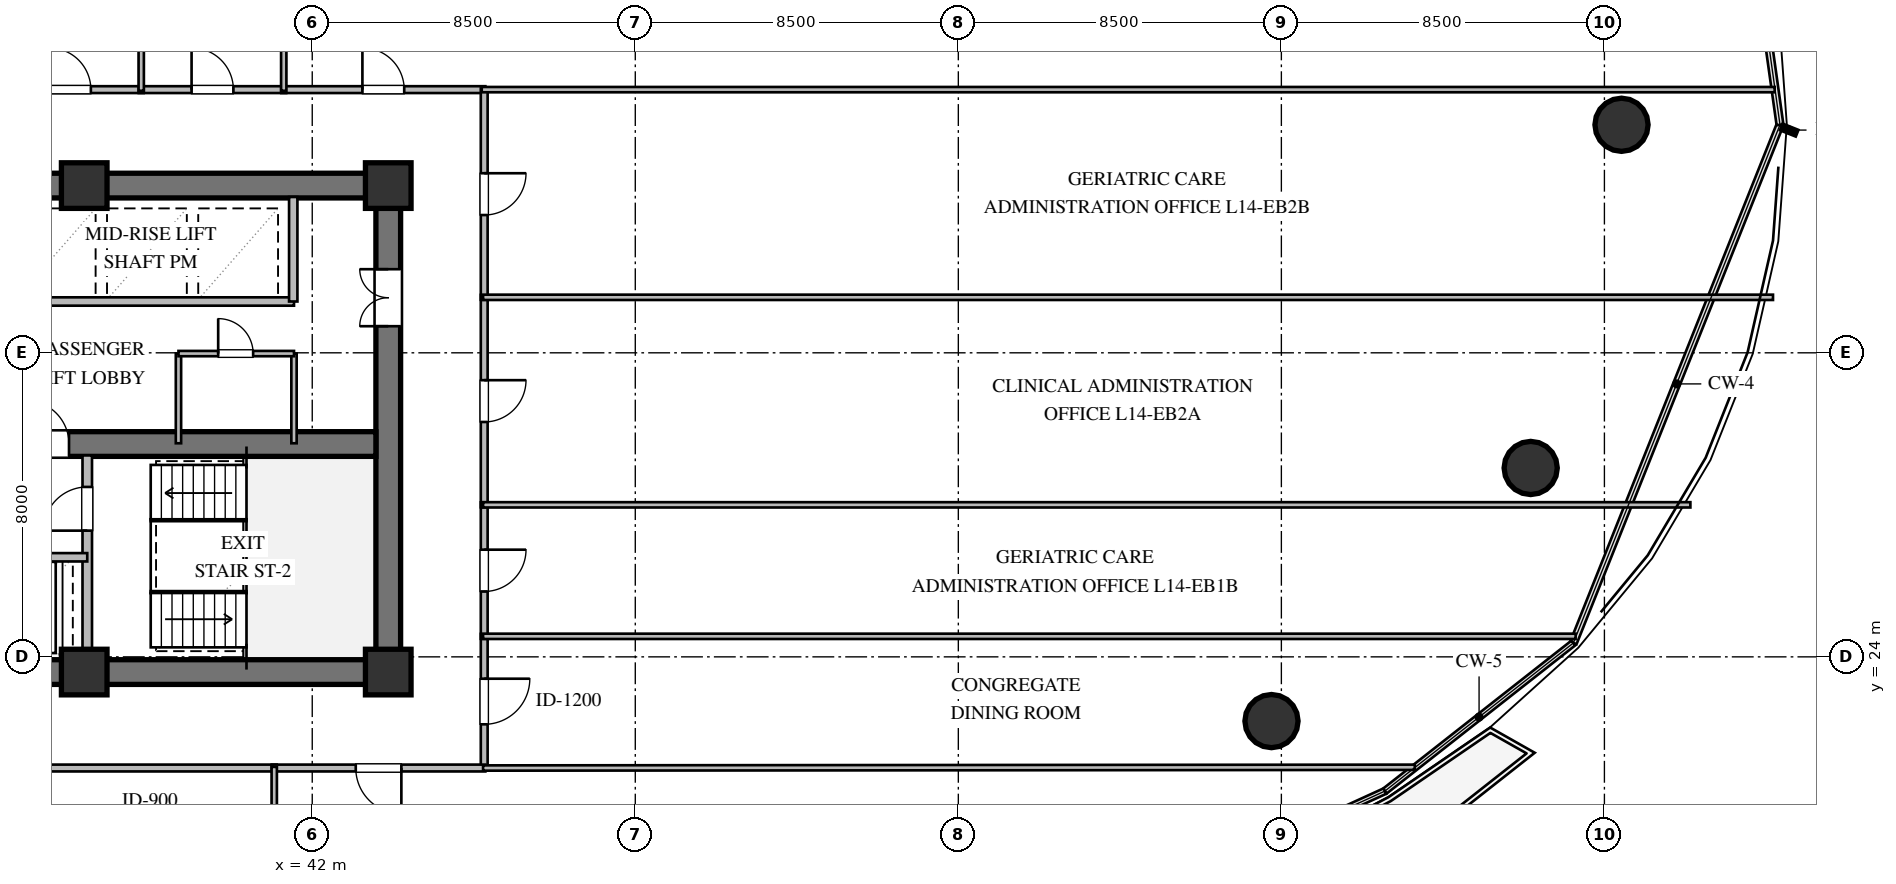
"""IFC4 building model, lengths in metres.
Left out: names, types, materials, properties, quantities, classifications, styles, units other than length and angle.
Written with IfcOpenShell. Run it as: python <this file> out.ifc"""

import sys

from ifc_helpers import new_model, si_unit, direction, frame, frame_2d, origin, origin_2d, place, context, subcontext, project, spatial, rectangle, circle, extrude, element, fill, save


model = new_model("IFC4")
c1 = context("Model", 3, precision=1e-05, world=origin(), true_north=direction((0.0, 1.0)))
c2 = subcontext(c1, "Body", "Model", "MODEL_VIEW")
j1 = project(units=[si_unit("LENGTHUNIT", "METRE"), si_unit("PLANEANGLEUNIT", "RADIAN")], contexts=[c1])
p1 = place(None, origin())
s1 = spatial("IfcSite", under=j1, at=p1, CompositionType="ELEMENT")
p2 = place(p1, origin())
s2 = spatial("IfcBuilding", under=s1, at=p2, CompositionType="ELEMENT")
p3 = place(p2, frame((0.0, 0.0, 56.4)))
s3 = spatial("IfcBuildingStorey", under=s2, at=p3, CompositionType="ELEMENT", Elevation=56.4)
for number, where, z_axis, x_axis in (
    (1, (21.675, 23.6, 0.0), (0.0, 0.0, 1.0), (1.0, 0.0, 0.0)),
    (2, (21.675, 36.4, 0.0), (0.0, 0.0, 1.0), (1.0, 0.0, 0.0)),
):
    element("IfcWall", number, at=place(p3, frame(where, z_axis=z_axis, x_axis=x_axis)), inside=s3, PredefinedType="SHEAR", context=c2, shape_type="SweptSolid", body=[
        extrude(rectangle(XDim=22.65, YDim=0.65, at=frame_2d((11.325, 0.0))), origin(), (0.0, 0.0, 1.0), 3.36),
    ])
p4 = place(p3, frame((44.0, 23.925, 0.0), z_axis=(0.0, 0.0, 1.0), x_axis=(0.0, 1.0, 0.0)))
e3 = element("IfcWall", 3, at=p4, inside=s3, PredefinedType="SHEAR", context=c2, shape_type="SweptSolid", body=[
    extrude(rectangle(XDim=12.15, YDim=0.65, at=frame_2d((6.075, 0.0))), origin(), (0.0, 0.0, 1.0), 3.36),
])
p5 = place(p4, frame((8.775, 0.0, 0.0)))
e4 = element("IfcOpeningElement", 4, at=p5, cuts=e3, PredefinedType="OPENING", context=c2, shape_type="SweptSolid", body=[
    extrude(rectangle(XDim=1.5, YDim=2.15, at=frame_2d((0.75, 1.075))), frame((0.0, 0.335, 0.0), z_axis=(0.0, -1.0, 0.0), x_axis=(1.0, 0.0, 0.0)), (0.0, 0.0, 1.0), 0.67),
])
p6 = place(p3, frame((22.325, 29.6, 0.0), z_axis=(0.0, 0.0, 1.0), x_axis=(1.0, 0.0, 0.0)))
e5 = element("IfcWall", 5, at=p6, inside=s3, PredefinedType="SHEAR", context=c2, shape_type="SweptSolid", body=[
    extrude(rectangle(XDim=21.35, YDim=0.65, at=frame_2d((10.675, 0.0))), origin(), (0.0, 0.0, 1.0), 3.36),
])
p7 = place(p6, frame((12.125, 0.0, 0.0)))
e6 = element("IfcOpeningElement", 6, at=p7, cuts=e5, PredefinedType="OPENING", context=c2, shape_type="SweptSolid", body=[
    extrude(rectangle(XDim=1.15, YDim=2.1, at=frame_2d((0.575, 1.05))), frame((0.0, 0.335, 0.0), z_axis=(0.0, -1.0, 0.0), x_axis=(1.0, 0.0, 0.0)), (0.0, 0.0, 1.0), 0.67),
])
for number, where, z_axis, x_axis in (
    (7, (36.0, 23.6, 0.0), (0.0, 0.0, 1.0), (1.0, 0.0, 0.0)),
    (8, (44.0, 23.6, 0.0), (0.0, 0.0, 1.0), (1.0, 0.0, 0.0)),
    (9, (44.0, 36.4, 0.0), (0.0, 0.0, 1.0), (1.0, 0.0, 0.0)),
    (10, (36.0, 36.4, 0.0), (0.0, 0.0, 1.0), (1.0, 0.0, 0.0)),
):
    element("IfcColumn", number, at=place(p3, frame(where, z_axis=z_axis, x_axis=x_axis)), inside=s3, PredefinedType="COLUMN", context=c2, shape_type="SweptSolid", body=[
        extrude(rectangle(XDim=1.2, YDim=1.2, at=origin_2d()), origin(), (0.0, 0.0, 1.0), 3.6),
    ])
for number, where, z_axis, x_axis in (
    (11, (76.45, 38.0, 0.0), (0.0, 0.0, 1.0), (1.0, 0.0, 0.0)),
    (12, (67.24, 22.31, 0.0), (0.0, 0.0, 1.0), (1.0, 0.0, 0.0)),
    (13, (74.06, 28.97, 0.0), (0.0, 0.0, 1.0), (1.0, 0.0, 0.0)),
):
    element("IfcColumn", number, at=place(p3, frame(where, z_axis=z_axis, x_axis=x_axis)), inside=s3, PredefinedType="COLUMN", context=c2, shape_type="SweptSolid", body=[
        extrude(circle(Radius=0.7, at=origin_2d()), origin(), (0.0, 0.0, 1.0), 3.6),
    ])
p8 = place(p3, frame((36.08, 23.9, 0.0), z_axis=(0.0, 0.0, 1.0), x_axis=(0.0, 1.0, 0.0)))
e14 = element("IfcWall", 14, at=p8, inside=s3, PredefinedType="SOLIDWALL", context=c2, shape_type="SweptSolid", body=[
    extrude(rectangle(XDim=5.4, YDim=0.25, at=frame_2d((2.7, 0.0))), origin(), (0.0, 0.0, 1.0), 3.36),
])
p9 = place(p8, frame((3.421, 0.0, 0.0)))
e15 = element("IfcOpeningElement", 15, at=p9, cuts=e14, PredefinedType="OPENING", context=c2, shape_type="SweptSolid", body=[
    extrude(rectangle(XDim=1.15, YDim=2.1, at=frame_2d((0.575, 1.05))), frame((0.0, 0.135, 0.0), z_axis=(0.0, -1.0, 0.0), x_axis=(1.0, 0.0, 0.0)), (0.0, 0.0, 1.0), 0.27),
])
p10 = place(p3, frame((29.92, 26.62, 0.0), z_axis=(0.0, 0.0, 1.0), x_axis=(1.0, 0.0, 0.0)))
e16 = element("IfcWall", 16, at=p10, inside=s3, PredefinedType="SOLIDWALL", context=c2, shape_type="SweptSolid", body=[
    extrude(rectangle(XDim=6.16, YDim=0.22, at=frame_2d((3.08, 0.0))), origin(), (0.0, 0.0, 1.0), 3.36),
])
p11 = place(p10, frame((0.99, 0.0, 0.0)))
e17 = element("IfcOpeningElement", 17, at=p11, cuts=e16, PredefinedType="OPENING", context=c2, shape_type="SweptSolid", body=[
    extrude(rectangle(XDim=1.1, YDim=2.1, at=frame_2d((0.55, 1.05))), frame((0.0, 0.12, 0.0), z_axis=(0.0, -1.0, 0.0), x_axis=(1.0, 0.0, 0.0)), (0.0, 0.0, 1.0), 0.24),
])
p12 = place(p10, frame((4.07, 0.0, 0.0)))
e18 = element("IfcOpeningElement", 18, at=p12, cuts=e16, PredefinedType="OPENING", context=c2, shape_type="SweptSolid", body=[
    extrude(rectangle(XDim=1.1, YDim=2.1, at=frame_2d((0.55, 1.05))), frame((0.0, 0.12, 0.0), z_axis=(0.0, -1.0, 0.0), x_axis=(1.0, 0.0, 0.0)), (0.0, 0.0, 1.0), 0.24),
])
p13 = place(p3, frame((33.98, 33.35, 0.0), z_axis=(0.0, 0.0, 1.0), x_axis=(1.0, 0.0, 0.0)))
e19 = element("IfcWall", 19, at=p13, inside=s3, PredefinedType="SOLIDWALL", context=c2, shape_type="SweptSolid", body=[
    extrude(rectangle(XDim=7.54, YDim=0.22, at=frame_2d((3.77, 0.0))), origin(), (0.0, 0.0, 1.0), 3.36),
])
p14 = place(p3, frame((41.5, 33.35, 0.0), z_axis=(0.0, 0.0, 1.0), x_axis=(0.0, 1.0, 0.0)))
e20 = element("IfcWall", 20, at=p14, inside=s3, PredefinedType="SOLIDWALL", context=c2, shape_type="SweptSolid", body=[
    extrude(rectangle(XDim=2.75, YDim=0.22, at=frame_2d((1.375, 0.0))), origin(), (0.0, 0.0, 1.0), 3.36),
])
for number, where, z_axis, x_axis in (
    (21, (38.48, 29.62, 0.0), (0.0, 0.0, 1.0), (0.0, 1.0, 0.0)),
    (22, (41.52, 29.62, 0.0), (0.0, 0.0, 1.0), (0.0, 1.0, 0.0)),
):
    element("IfcWall", number, at=place(p3, frame(where, z_axis=z_axis, x_axis=x_axis)), inside=s3, PredefinedType="PARTITIONING", context=c2, shape_type="SweptSolid", body=[
        extrude(rectangle(XDim=2.36, YDim=0.14, at=frame_2d((1.18, 0.0))), origin(), (0.0, 0.0, 1.0), 3.36),
    ])
p15 = place(p3, frame((38.48, 31.98, 0.0), z_axis=(0.0, 0.0, 1.0), x_axis=(1.0, 0.0, 0.0)))
e23 = element("IfcWall", 23, at=p15, inside=s3, PredefinedType="PARTITIONING", context=c2, shape_type="SweptSolid", body=[
    extrude(rectangle(XDim=3.04, YDim=0.14, at=frame_2d((1.52, 0.0))), origin(), (0.0, 0.0, 1.0), 3.36),
])
p16 = place(p15, frame((1.045, 0.0, 0.0)))
e24 = element("IfcOpeningElement", 24, at=p16, cuts=e23, PredefinedType="OPENING", context=c2, shape_type="SweptSolid", body=[
    extrude(rectangle(XDim=0.92, YDim=2.1, at=frame_2d((0.46, 1.05))), frame((0.0, 0.08, 0.0), z_axis=(0.0, -1.0, 0.0), x_axis=(1.0, 0.0, 0.0)), (0.0, 0.0, 1.0), 0.16),
])
p17 = place(p3, frame((33.685, 38.925, 0.0), z_axis=(0.0, 0.0, 1.0), x_axis=(1.0, 0.0, 0.0)))
e25 = element("IfcWall", 25, at=p17, inside=s3, PredefinedType="PARTITIONING", context=c2, shape_type="SweptSolid", body=[
    extrude(rectangle(XDim=3.88, YDim=0.18, at=frame_2d((1.94, 0.0))), origin(), (0.0, 0.0, 1.0), 3.36),
])
p18 = place(p17, frame((1.39, 0.0, 0.0)))
e26 = element("IfcOpeningElement", 26, at=p18, cuts=e25, PredefinedType="OPENING", context=c2, shape_type="SweptSolid", body=[
    extrude(rectangle(XDim=1.1, YDim=2.1, at=frame_2d((0.55, 1.05))), frame((0.0, 0.1, 0.0), z_axis=(0.0, -1.0, 0.0), x_axis=(1.0, 0.0, 0.0)), (0.0, 0.0, 1.0), 0.2),
])
p19 = place(p3, frame((37.435, 38.925, 0.0), z_axis=(0.0, 0.0, 1.0), x_axis=(1.0, 0.0, 0.0)))
e27 = element("IfcWall", 27, at=p19, inside=s3, PredefinedType="PARTITIONING", context=c2, shape_type="SweptSolid", body=[
    extrude(rectangle(XDim=3.88, YDim=0.18, at=frame_2d((1.94, 0.0))), origin(), (0.0, 0.0, 1.0), 3.36),
])
p20 = place(p19, frame((1.39, 0.0, 0.0)))
e28 = element("IfcOpeningElement", 28, at=p20, cuts=e27, PredefinedType="OPENING", context=c2, shape_type="SweptSolid", body=[
    extrude(rectangle(XDim=1.1, YDim=2.1, at=frame_2d((0.55, 1.05))), frame((0.0, 0.1, 0.0), z_axis=(0.0, -1.0, 0.0), x_axis=(1.0, 0.0, 0.0)), (0.0, 0.0, 1.0), 0.2),
])
p21 = place(p3, frame((41.185, 38.925, 0.0), z_axis=(0.0, 0.0, 1.0), x_axis=(1.0, 0.0, 0.0)))
e29 = element("IfcWall", 29, at=p21, inside=s3, PredefinedType="PARTITIONING", context=c2, shape_type="SweptSolid", body=[
    extrude(rectangle(XDim=5.37, YDim=0.18, at=frame_2d((2.685, 0.0))), origin(), (0.0, 0.0, 1.0), 3.36),
])
p22 = place(p21, frame((2.135, 0.0, 0.0)))
e30 = element("IfcOpeningElement", 30, at=p22, cuts=e29, PredefinedType="OPENING", context=c2, shape_type="SweptSolid", body=[
    extrude(rectangle(XDim=1.1, YDim=2.1, at=frame_2d((0.55, 1.05))), frame((0.0, 0.1, 0.0), z_axis=(0.0, -1.0, 0.0), x_axis=(1.0, 0.0, 0.0)), (0.0, 0.0, 1.0), 0.2),
])
p23 = place(p3, frame((46.525, 24.605, 0.0), z_axis=(0.0, 0.0, 1.0), x_axis=(0.0, -1.0, 0.0)))
e31 = element("IfcWall", 31, at=p23, inside=s3, PredefinedType="PARTITIONING", context=c2, shape_type="SweptSolid", body=[
    extrude(rectangle(XDim=3.56, YDim=0.18, at=frame_2d((1.78, 0.0))), origin(), (0.0, 0.0, 1.0), 3.36),
])
p24 = place(p23, frame((1.18, 0.0, 0.0)))
e32 = element("IfcOpeningElement", 32, at=p24, cuts=e31, PredefinedType="OPENING", context=c2, shape_type="SweptSolid", body=[
    extrude(rectangle(XDim=1.2, YDim=2.15, at=frame_2d((0.6, 1.075))), frame((0.0, 0.1, 0.0), z_axis=(0.0, -1.0, 0.0), x_axis=(1.0, 0.0, 0.0)), (0.0, 0.0, 1.0), 0.2),
])
p25 = place(p3, frame((46.525, 28.065, 0.0), z_axis=(0.0, 0.0, 1.0), x_axis=(0.0, -1.0, 0.0)))
e33 = element("IfcWall", 33, at=p25, inside=s3, PredefinedType="PARTITIONING", context=c2, shape_type="SweptSolid", body=[
    extrude(rectangle(XDim=3.59, YDim=0.18, at=frame_2d((1.795, 0.0))), origin(), (0.0, 0.0, 1.0), 3.36),
])
p26 = place(p25, frame((1.245, 0.0, 0.0)))
e34 = element("IfcOpeningElement", 34, at=p26, cuts=e33, PredefinedType="OPENING", context=c2, shape_type="SweptSolid", body=[
    extrude(rectangle(XDim=1.1, YDim=2.1, at=frame_2d((0.55, 1.05))), frame((0.0, 0.1, 0.0), z_axis=(0.0, -1.0, 0.0), x_axis=(1.0, 0.0, 0.0)), (0.0, 0.0, 1.0), 0.2),
])
p27 = place(p3, frame((46.525, 33.525, 0.0), z_axis=(0.0, 0.0, 1.0), x_axis=(0.0, -1.0, 0.0)))
e35 = element("IfcWall", 35, at=p27, inside=s3, PredefinedType="PARTITIONING", context=c2, shape_type="SweptSolid", body=[
    extrude(rectangle(XDim=5.59, YDim=0.18, at=frame_2d((2.795, 0.0))), origin(), (0.0, 0.0, 1.0), 3.36),
])
p28 = place(p27, frame((2.245, 0.0, 0.0)))
e36 = element("IfcOpeningElement", 36, at=p28, cuts=e35, PredefinedType="OPENING", context=c2, shape_type="SweptSolid", body=[
    extrude(rectangle(XDim=1.1, YDim=2.1, at=frame_2d((0.55, 1.05))), frame((0.0, 0.1, 0.0), z_axis=(0.0, -1.0, 0.0), x_axis=(1.0, 0.0, 0.0)), (0.0, 0.0, 1.0), 0.2),
])
p29 = place(p3, frame((46.525, 38.955, 0.0), z_axis=(0.0, 0.0, 1.0), x_axis=(0.0, -1.0, 0.0)))
e37 = element("IfcWall", 37, at=p29, inside=s3, PredefinedType="PARTITIONING", context=c2, shape_type="SweptSolid", body=[
    extrude(rectangle(XDim=5.56, YDim=0.18, at=frame_2d((2.78, 0.0))), origin(), (0.0, 0.0, 1.0), 3.36),
])
p30 = place(p29, frame((2.23, 0.0, 0.0)))
e38 = element("IfcOpeningElement", 38, at=p30, cuts=e37, PredefinedType="OPENING", context=c2, shape_type="SweptSolid", body=[
    extrude(rectangle(XDim=1.1, YDim=2.1, at=frame_2d((0.55, 1.05))), frame((0.0, 0.1, 0.0), z_axis=(0.0, -1.0, 0.0), x_axis=(1.0, 0.0, 0.0)), (0.0, 0.0, 1.0), 0.2),
])
p31 = place(p3, frame((41.065, 21.075, 0.0), z_axis=(0.0, 0.0, 1.0), x_axis=(-1.0, 0.0, 0.0)))
e39 = element("IfcWall", 39, at=p31, inside=s3, PredefinedType="PARTITIONING", context=c2, shape_type="SweptSolid", body=[
    extrude(rectangle(XDim=13.13, YDim=0.18, at=frame_2d((6.565, 0.0))), origin(), (0.0, 0.0, 1.0), 2.996),
])
p32 = place(p31, frame((6.015, 0.0, 0.0)))
e40 = element("IfcOpeningElement", 40, at=p32, cuts=e39, PredefinedType="OPENING", context=c2, shape_type="SweptSolid", body=[
    extrude(rectangle(XDim=1.1, YDim=2.1, at=frame_2d((0.55, 1.05))), frame((0.0, 0.1, 0.0), z_axis=(0.0, -1.0, 0.0), x_axis=(1.0, 0.0, 0.0)), (0.0, 0.0, 1.0), 0.2),
])
p33 = place(p3, frame((46.555, 21.075, 0.0), z_axis=(0.0, 0.0, 1.0), x_axis=(-1.0, 0.0, 0.0)))
e41 = element("IfcWall", 41, at=p33, inside=s3, PredefinedType="PARTITIONING", context=c2, shape_type="SweptSolid", body=[
    extrude(rectangle(XDim=5.62, YDim=0.18, at=frame_2d((2.81, 0.0))), origin(), (0.0, 0.0, 1.0), 3.36),
])
p34 = place(p33, frame((2.21, 0.0, 0.0)))
e42 = element("IfcOpeningElement", 42, at=p34, cuts=e41, PredefinedType="OPENING", context=c2, shape_type="SweptSolid", body=[
    extrude(rectangle(XDim=1.2, YDim=2.15, at=frame_2d((0.6, 1.075))), frame((0.0, 0.1, 0.0), z_axis=(0.0, -1.0, 0.0), x_axis=(1.0, 0.0, 0.0)), (0.0, 0.0, 1.0), 0.2),
])
p35 = place(p3, frame((37.5, 66.717, 0.0), z_axis=(0.0, 0.0, 1.0), x_axis=(0.0, -1.0, 0.0)))
e43 = element("IfcWall", 43, at=p35, inside=s3, PredefinedType="PARTITIONING", context=c2, shape_type="SweptSolid", body=[
    extrude(rectangle(XDim=27.822, YDim=0.14, at=frame_2d((13.911, 0.0))), origin(), (0.0, 0.0, 1.0), 3.36),
])
p36 = place(p3, frame((41.25, 65.638, 0.0), z_axis=(0.0, 0.0, 1.0), x_axis=(0.0, -1.0, 0.0)))
e44 = element("IfcWall", 44, at=p36, inside=s3, PredefinedType="PARTITIONING", context=c2, shape_type="SweptSolid", body=[
    extrude(rectangle(XDim=26.743, YDim=0.14, at=frame_2d((13.372, 0.0))), origin(), (0.0, 0.0, 1.0), 3.36),
])
p37 = place(p3, frame((80.48, 38.925, 0.0), z_axis=(0.0, 0.0, 1.0), x_axis=(-1.0, 0.0, 0.0)))
e45 = element("IfcWall", 45, at=p37, inside=s3, PredefinedType="PARTITIONING", context=c2, shape_type="SweptSolid", body=[
    extrude(rectangle(XDim=34.02, YDim=0.14, at=frame_2d((17.01, 0.0))), origin(), (0.0, 0.0, 1.0), 3.36),
])
p38 = place(p3, frame((46.495, 24.54, 0.0), z_axis=(0.0, 0.0, 1.0), x_axis=(1.0, 0.0, 0.0)))
e46 = element("IfcWall", 46, at=p38, inside=s3, PredefinedType="PARTITIONING", context=c2, shape_type="SweptSolid", body=[
    extrude(rectangle(XDim=28.747, YDim=0.14, at=frame_2d((14.374, 0.0))), origin(), (0.0, 0.0, 1.0), 2.806),
])
p39 = place(p3, frame((71.011, 21.094, 0.0), z_axis=(0.0, 0.0, 1.0), x_axis=(-0.999999682646, -0.000796685534, 0.0)))
e47 = element("IfcWall", 47, at=p39, inside=s3, PredefinedType="PARTITIONING", context=c2, shape_type="SweptSolid", body=[
    extrude(rectangle(XDim=24.516, YDim=0.14, at=frame_2d((12.258, 0.0))), origin(), (0.0, 0.0, 1.0), 2.996),
])
p40 = place(p3, frame((46.495, 28.0, 0.0), z_axis=(0.0, 0.0, 1.0), x_axis=(1.0, 0.0, 0.0)))
e48 = element("IfcWall", 48, at=p40, inside=s3, PredefinedType="PARTITIONING", context=c2, shape_type="SweptSolid", body=[
    extrude(rectangle(XDim=31.767, YDim=0.14, at=frame_2d((15.883, 0.0))), origin(), (0.0, 0.0, 1.0), 2.806),
])
p41 = place(p3, frame((46.495, 33.46, 0.0), z_axis=(0.0, 0.0, 1.0), x_axis=(1.0, 0.0, 0.0)))
e49 = element("IfcWall", 49, at=p41, inside=s3, PredefinedType="PARTITIONING", context=c2, shape_type="SweptSolid", body=[
    extrude(rectangle(XDim=33.941, YDim=0.14, at=frame_2d((16.97, 0.0))), origin(), (0.0, 0.0, 1.0), 3.36),
])
p42 = place(p3, frame((41.0, 21.105, 0.0), z_axis=(0.0, 0.0, 1.0), x_axis=(0.0, -1.0, 0.0)))
e50 = element("IfcWall", 50, at=p42, inside=s3, PredefinedType="PARTITIONING", context=c2, shape_type="SweptSolid", body=[
    extrude(rectangle(XDim=6.205, YDim=0.14, at=frame_2d((3.103, 0.0))), origin(), (0.0, 0.0, 1.0), 3.36),
])
p43 = place(p9, origin())
e51 = element("IfcDoor", 51, at=p43, inside=s3, OperationType="SINGLE_SWING_LEFT", PredefinedType="DOOR", context=c2, shape_type="SweptSolid", body=[
    extrude(rectangle(XDim=1.15, YDim=2.1, at=frame_2d((0.575, 1.05))), frame((0.0, 0.025, 0.0), z_axis=(0.0, -1.0, 0.0), x_axis=(1.0, 0.0, 0.0)), (0.0, 0.0, 1.0), 0.05),
])
fill(e15, e51)
p44 = place(p7, origin())
e52 = element("IfcDoor", 52, at=p44, inside=s3, OperationType="SINGLE_SWING_LEFT", PredefinedType="DOOR", context=c2, shape_type="SweptSolid", body=[
    extrude(rectangle(XDim=1.15, YDim=2.1, at=frame_2d((0.575, 1.05))), frame((0.0, 0.025, 0.0), z_axis=(0.0, -1.0, 0.0), x_axis=(1.0, 0.0, 0.0)), (0.0, 0.0, 1.0), 0.05),
])
fill(e6, e52)
p45 = place(p5, origin())
e53 = element("IfcDoor", 53, at=p45, inside=s3, OperationType="DOUBLE_DOOR_SINGLE_SWING", PredefinedType="DOOR", context=c2, shape_type="SweptSolid", body=[
    extrude(rectangle(XDim=1.5, YDim=2.15, at=frame_2d((0.75, 1.075))), frame((0.0, 0.025, 0.0), z_axis=(0.0, -1.0, 0.0), x_axis=(1.0, 0.0, 0.0)), (0.0, 0.0, 1.0), 0.05),
])
fill(e4, e53)
p46 = place(p16, origin())
e54 = element("IfcDoor", 54, at=p46, inside=s3, OperationType="SINGLE_SWING_LEFT", PredefinedType="DOOR", context=c2, shape_type="SweptSolid", body=[
    extrude(rectangle(XDim=0.92, YDim=2.1, at=frame_2d((0.46, 1.05))), frame((0.0, 0.025, 0.0), z_axis=(0.0, -1.0, 0.0), x_axis=(1.0, 0.0, 0.0)), (0.0, 0.0, 1.0), 0.05),
])
fill(e24, e54)
p47 = place(p18, origin())
e55 = element("IfcDoor", 55, at=p47, inside=s3, OperationType="SINGLE_SWING_LEFT", PredefinedType="DOOR", context=c2, shape_type="SweptSolid", body=[
    extrude(rectangle(XDim=1.1, YDim=2.1, at=frame_2d((0.55, 1.05))), frame((0.0, 0.025, 0.0), z_axis=(0.0, -1.0, 0.0), x_axis=(1.0, 0.0, 0.0)), (0.0, 0.0, 1.0), 0.05),
])
fill(e26, e55)
p48 = place(p20, origin())
e56 = element("IfcDoor", 56, at=p48, inside=s3, OperationType="SINGLE_SWING_LEFT", PredefinedType="DOOR", context=c2, shape_type="SweptSolid", body=[
    extrude(rectangle(XDim=1.1, YDim=2.1, at=frame_2d((0.55, 1.05))), frame((0.0, 0.025, 0.0), z_axis=(0.0, -1.0, 0.0), x_axis=(1.0, 0.0, 0.0)), (0.0, 0.0, 1.0), 0.05),
])
fill(e28, e56)
p49 = place(p22, origin())
e57 = element("IfcDoor", 57, at=p49, inside=s3, OperationType="SINGLE_SWING_LEFT", PredefinedType="DOOR", context=c2, shape_type="SweptSolid", body=[
    extrude(rectangle(XDim=1.1, YDim=2.1, at=frame_2d((0.55, 1.05))), frame((0.0, 0.025, 0.0), z_axis=(0.0, -1.0, 0.0), x_axis=(1.0, 0.0, 0.0)), (0.0, 0.0, 1.0), 0.05),
])
fill(e30, e57)
p50 = place(p24, origin())
e58 = element("IfcDoor", 58, at=p50, inside=s3, OperationType="SINGLE_SWING_LEFT", PredefinedType="DOOR", context=c2, shape_type="SweptSolid", body=[
    extrude(rectangle(XDim=1.2, YDim=2.15, at=frame_2d((0.6, 1.075))), frame((0.0, 0.025, 0.0), z_axis=(0.0, -1.0, 0.0), x_axis=(1.0, 0.0, 0.0)), (0.0, 0.0, 1.0), 0.05),
])
fill(e32, e58)
p51 = place(p26, origin())
e59 = element("IfcDoor", 59, at=p51, inside=s3, OperationType="SINGLE_SWING_LEFT", PredefinedType="DOOR", context=c2, shape_type="SweptSolid", body=[
    extrude(rectangle(XDim=1.1, YDim=2.1, at=frame_2d((0.55, 1.05))), frame((0.0, 0.025, 0.0), z_axis=(0.0, -1.0, 0.0), x_axis=(1.0, 0.0, 0.0)), (0.0, 0.0, 1.0), 0.05),
])
fill(e34, e59)
p52 = place(p28, origin())
e60 = element("IfcDoor", 60, at=p52, inside=s3, OperationType="SINGLE_SWING_LEFT", PredefinedType="DOOR", context=c2, shape_type="SweptSolid", body=[
    extrude(rectangle(XDim=1.1, YDim=2.1, at=frame_2d((0.55, 1.05))), frame((0.0, 0.025, 0.0), z_axis=(0.0, -1.0, 0.0), x_axis=(1.0, 0.0, 0.0)), (0.0, 0.0, 1.0), 0.05),
])
fill(e36, e60)
p53 = place(p30, origin())
e61 = element("IfcDoor", 61, at=p53, inside=s3, OperationType="SINGLE_SWING_LEFT", PredefinedType="DOOR", context=c2, shape_type="SweptSolid", body=[
    extrude(rectangle(XDim=1.1, YDim=2.1, at=frame_2d((0.55, 1.05))), frame((0.0, 0.025, 0.0), z_axis=(0.0, -1.0, 0.0), x_axis=(1.0, 0.0, 0.0)), (0.0, 0.0, 1.0), 0.05),
])
fill(e38, e61)
p54 = place(p34, origin())
e62 = element("IfcDoor", 62, at=p54, inside=s3, OperationType="SINGLE_SWING_LEFT", PredefinedType="DOOR", context=c2, shape_type="SweptSolid", body=[
    extrude(rectangle(XDim=1.2, YDim=2.15, at=frame_2d((0.6, 1.075))), frame((0.0, 0.025, 0.0), z_axis=(0.0, -1.0, 0.0), x_axis=(1.0, 0.0, 0.0)), (0.0, 0.0, 1.0), 0.05),
])
fill(e42, e62)
save(model, sys.argv[1])
